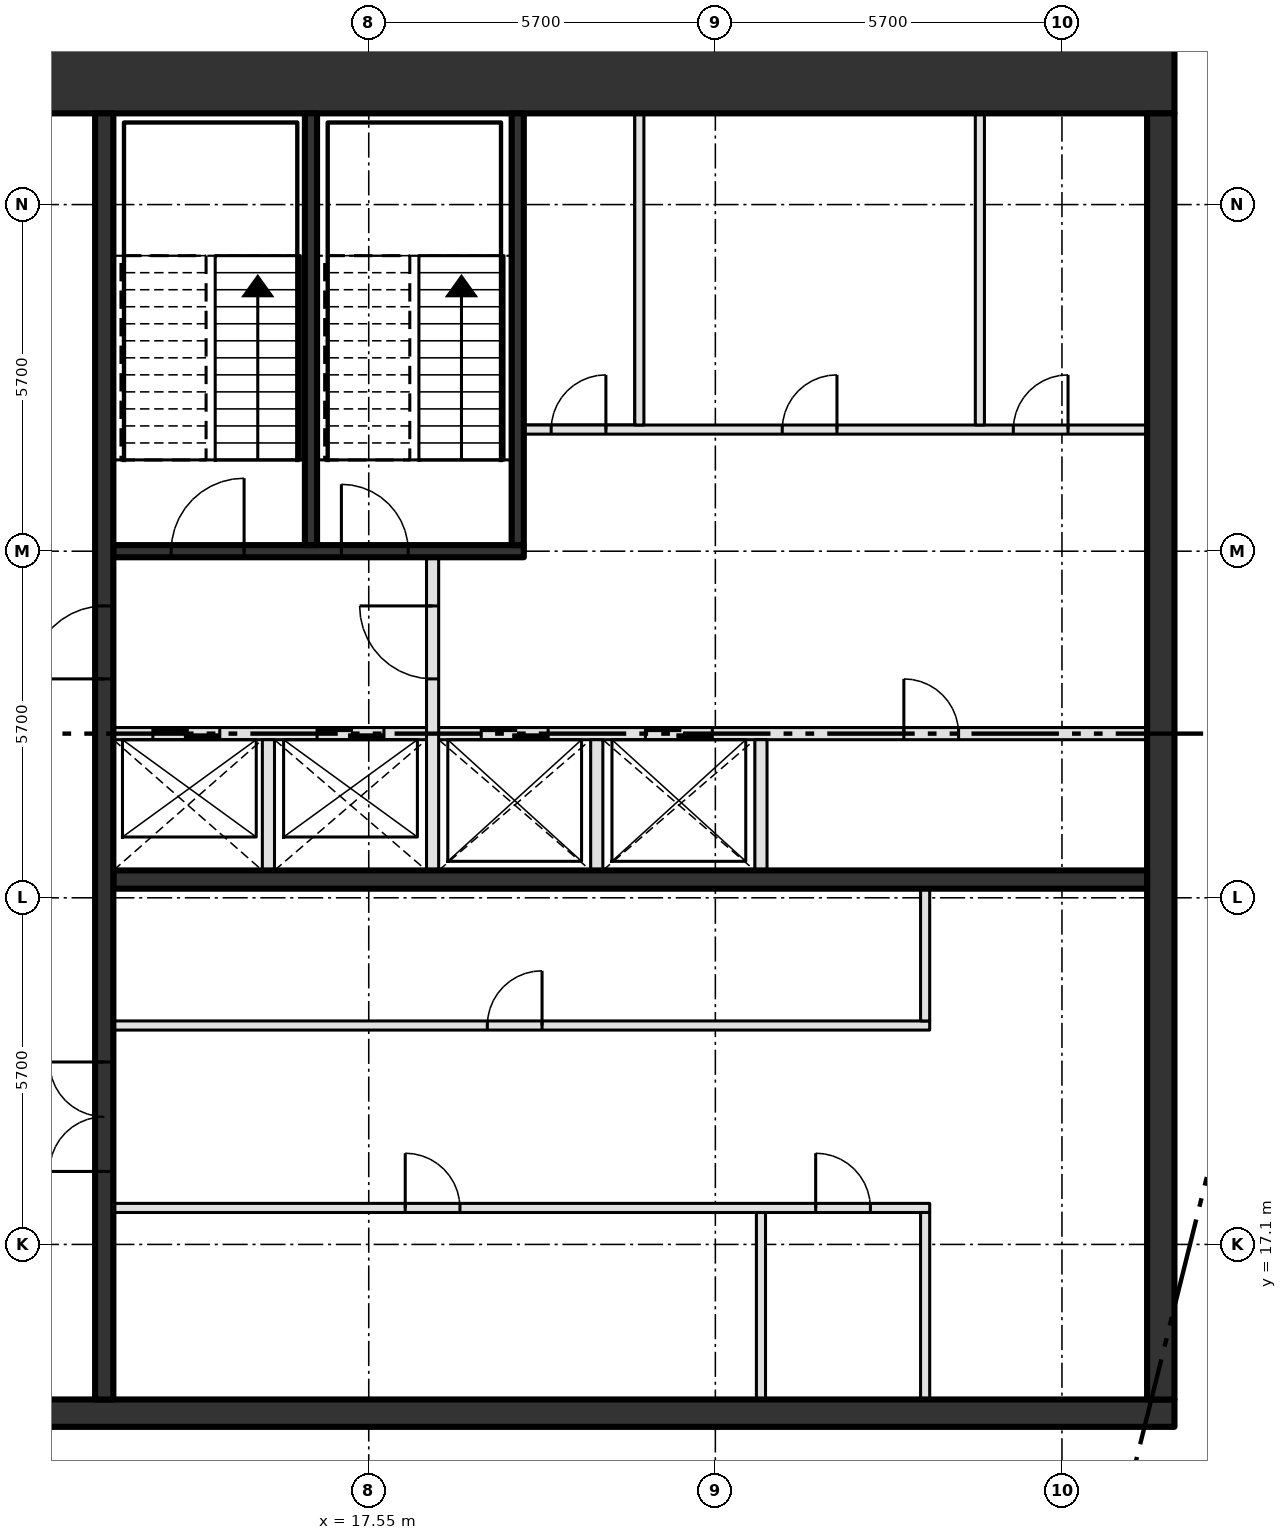
"""IFC4 building model, lengths in metres.
Left out: names, types, materials, properties, quantities, classifications, styles, units other than length and angle.
Written with IfcOpenShell. Run it as: python <this file> out.ifc"""

import sys

from ifc_helpers import new_model, si_unit, direction, frame, frame_2d, origin, place, context, subcontext, project, spatial, rectangle, extrude, element, fill, save


model = new_model("IFC4")
c1 = context("Model", 3, precision=1e-05, world=origin(), true_north=direction((0.0, 1.0)))
c2 = subcontext(c1, "Body", "Model", "MODEL_VIEW")
j1 = project(units=[si_unit("LENGTHUNIT", "METRE"), si_unit("PLANEANGLEUNIT", "RADIAN")], contexts=[c1])
p1 = place(None, origin())
s1 = spatial("IfcSite", under=j1, at=p1, CompositionType="ELEMENT")
p2 = place(p1, origin())
s2 = spatial("IfcBuilding", under=s1, at=p2, CompositionType="ELEMENT")
p3 = place(p2, frame((0.0, 0.0, 405.0)))
s3 = spatial("IfcBuildingStorey", under=s2, at=p3, CompositionType="ELEMENT", Elevation=405.0)
p4 = place(p3, frame((8.0, 14.325, -0.3), z_axis=(0.0, 0.0, 1.0), x_axis=(1.0, 0.0, 0.0)))
e1 = element("IfcWall", 1, at=p4, inside=s3, PredefinedType="SHEAR", context=c2, shape_type="SweptSolid", body=[
    extrude(rectangle(XDim=22.8, YDim=0.45, at=frame_2d((11.4, 0.0))), origin(), (0.0, 0.0, 1.0), 4.65),
])
p5 = place(p4, frame((2.3, 0.0, 0.3)))
e2 = element("IfcOpeningElement", 2, at=p5, cuts=e1, PredefinedType="OPENING", context=c2, shape_type="SweptSolid", body=[
    extrude(rectangle(XDim=1.8, YDim=2.1, at=frame_2d((0.9, 1.05))), frame((0.0, 0.235, 0.0), z_axis=(0.0, -1.0, 0.0), x_axis=(1.0, 0.0, 0.0)), (0.0, 0.0, 1.0), 0.47),
])
p6 = place(p3, frame((8.0, 36.3, -0.3), z_axis=(0.0, 0.0, 1.0), x_axis=(1.0, 0.0, 0.0)))
e3 = element("IfcWall", 3, at=p6, inside=s3, PredefinedType="SHEAR", context=c2, shape_type="SweptSolid", body=[
    extrude(rectangle(XDim=22.8, YDim=1.2, at=frame_2d((11.4, 0.0))), origin(), (0.0, 0.0, 1.0), 4.65),
])
p7 = place(p6, frame((2.3, 0.0, 0.3)))
e4 = element("IfcOpeningElement", 4, at=p7, cuts=e3, PredefinedType="OPENING", context=c2, shape_type="SweptSolid", body=[
    extrude(rectangle(XDim=1.8, YDim=2.1, at=frame_2d((0.9, 1.05))), frame((0.0, 0.61, 0.0), z_axis=(0.0, -1.0, 0.0), x_axis=(1.0, 0.0, 0.0)), (0.0, 0.0, 1.0), 1.22),
])
p8 = place(p3, frame((30.575, 14.55, -0.3), z_axis=(0.0, 0.0, 1.0), x_axis=(0.0, 1.0, 0.0)))
e5 = element("IfcWall", 5, at=p8, inside=s3, PredefinedType="SHEAR", context=c2, shape_type="SweptSolid", body=[
    extrude(rectangle(XDim=21.15, YDim=0.45, at=frame_2d((10.575, 0.0))), origin(), (0.0, 0.0, 1.0), 4.65),
])
p9 = place(p3, frame((13.35, 17.7, 0.0), z_axis=(0.0, 0.0, 1.0), x_axis=(1.0, 0.0, 0.0)))
e6 = element("IfcWall", 6, at=p9, inside=s3, PredefinedType="PARTITIONING", context=c2, shape_type="SweptSolid", body=[
    extrude(rectangle(XDim=13.425, YDim=0.15, at=frame_2d((6.712, 0.0))), origin(), (0.0, 0.0, 1.0), 4.35),
])
p10 = place(p9, frame((4.8, 0.0, 0.0)))
e7 = element("IfcOpeningElement", 7, at=p10, cuts=e6, PredefinedType="OPENING", context=c2, shape_type="SweptSolid", body=[
    extrude(rectangle(XDim=0.9, YDim=2.1, at=frame_2d((0.45, 1.05))), frame((0.0, 0.085, 0.0), z_axis=(0.0, -1.0, 0.0), x_axis=(1.0, 0.0, 0.0)), (0.0, 0.0, 1.0), 0.17),
])
p11 = place(p9, frame((11.55, 0.0, 0.0)))
e8 = element("IfcOpeningElement", 8, at=p11, cuts=e6, PredefinedType="OPENING", context=c2, shape_type="SweptSolid", body=[
    extrude(rectangle(XDim=0.9, YDim=2.1, at=frame_2d((0.45, 1.05))), frame((0.0, 0.085, 0.0), z_axis=(0.0, -1.0, 0.0), x_axis=(1.0, 0.0, 0.0)), (0.0, 0.0, 1.0), 0.17),
])
p12 = place(p3, frame((13.35, 20.7, 0.0), z_axis=(0.0, 0.0, 1.0), x_axis=(1.0, 0.0, 0.0)))
e9 = element("IfcWall", 9, at=p12, inside=s3, PredefinedType="PARTITIONING", context=c2, shape_type="SweptSolid", body=[
    extrude(rectangle(XDim=13.425, YDim=0.15, at=frame_2d((6.712, 0.0))), origin(), (0.0, 0.0, 1.0), 4.35),
])
p13 = place(p12, frame((6.15, 0.0, 0.0)))
e10 = element("IfcOpeningElement", 10, at=p13, cuts=e9, PredefinedType="OPENING", context=c2, shape_type="SweptSolid", body=[
    extrude(rectangle(XDim=0.9, YDim=2.1, at=frame_2d((0.45, 1.05))), frame((0.0, 0.085, 0.0), z_axis=(0.0, -1.0, 0.0), x_axis=(1.0, 0.0, 0.0)), (0.0, 0.0, 1.0), 0.17),
])
p14 = place(p3, frame((13.35, 23.1, 0.0), z_axis=(0.0, 0.0, 1.0), x_axis=(1.0, 0.0, 0.0)))
e11 = element("IfcWall", 11, at=p14, inside=s3, PredefinedType="SHEAR", context=c2, shape_type="SweptSolid", body=[
    extrude(rectangle(XDim=17.0, YDim=0.3, at=frame_2d((8.5, 0.0))), origin(), (0.0, 0.0, 1.0), 4.35),
])
p15 = place(p3, frame((13.35, 25.5, 0.0), z_axis=(0.0, 0.0, 1.0), x_axis=(1.0, 0.0, 0.0)))
e12 = element("IfcWall", 12, at=p15, inside=s3, PredefinedType="SOLIDWALL", context=c2, shape_type="SweptSolid", body=[
    extrude(rectangle(XDim=17.0, YDim=0.2, at=frame_2d((8.5, 0.0))), origin(), (0.0, 0.0, 1.0), 4.35),
])
p16 = place(p15, frame((0.65, 0.0, 0.0)))
e13 = element("IfcOpeningElement", 13, at=p16, cuts=e12, PredefinedType="OPENING", context=c2, shape_type="SweptSolid", body=[
    extrude(rectangle(XDim=1.1, YDim=2.1, at=frame_2d((0.55, 1.05))), frame((0.0, 0.11, 0.0), z_axis=(0.0, -1.0, 0.0), x_axis=(1.0, 0.0, 0.0)), (0.0, 0.0, 1.0), 0.22),
])
p17 = place(p15, frame((3.35, 0.0, 0.0)))
e14 = element("IfcOpeningElement", 14, at=p17, cuts=e12, PredefinedType="OPENING", context=c2, shape_type="SweptSolid", body=[
    extrude(rectangle(XDim=1.1, YDim=2.1, at=frame_2d((0.55, 1.05))), frame((0.0, 0.11, 0.0), z_axis=(0.0, -1.0, 0.0), x_axis=(1.0, 0.0, 0.0)), (0.0, 0.0, 1.0), 0.22),
])
p18 = place(p15, frame((6.05, 0.0, 0.0)))
e15 = element("IfcOpeningElement", 15, at=p18, cuts=e12, PredefinedType="OPENING", context=c2, shape_type="SweptSolid", body=[
    extrude(rectangle(XDim=1.1, YDim=2.1, at=frame_2d((0.55, 1.05))), frame((0.0, 0.11, 0.0), z_axis=(0.0, -1.0, 0.0), x_axis=(1.0, 0.0, 0.0)), (0.0, 0.0, 1.0), 0.22),
])
p19 = place(p15, frame((8.75, 0.0, 0.0)))
e16 = element("IfcOpeningElement", 16, at=p19, cuts=e12, PredefinedType="OPENING", context=c2, shape_type="SweptSolid", body=[
    extrude(rectangle(XDim=1.1, YDim=2.1, at=frame_2d((0.55, 1.05))), frame((0.0, 0.11, 0.0), z_axis=(0.0, -1.0, 0.0), x_axis=(1.0, 0.0, 0.0)), (0.0, 0.0, 1.0), 0.22),
])
p20 = place(p15, frame((13.0, 0.0, 0.0)))
e17 = element("IfcOpeningElement", 17, at=p20, cuts=e12, PredefinedType="OPENING", context=c2, shape_type="SweptSolid", body=[
    extrude(rectangle(XDim=0.9, YDim=2.1, at=frame_2d((0.45, 1.05))), frame((0.0, 0.11, 0.0), z_axis=(0.0, -1.0, 0.0), x_axis=(1.0, 0.0, 0.0)), (0.0, 0.0, 1.0), 0.22),
])
p21 = place(p3, frame((13.35, 28.5, 0.0), z_axis=(0.0, 0.0, 1.0), x_axis=(1.0, 0.0, 0.0)))
e18 = element("IfcWall", 18, at=p21, inside=s3, PredefinedType="SOLIDWALL", context=c2, shape_type="SweptSolid", body=[
    extrude(rectangle(XDim=6.75, YDim=0.2, at=frame_2d((3.375, 0.0))), origin(), (0.0, 0.0, 1.0), 4.35),
])
p22 = place(p21, frame((0.95, 0.0, 0.0)))
e19 = element("IfcOpeningElement", 19, at=p22, cuts=e18, PredefinedType="OPENING", context=c2, shape_type="SweptSolid", body=[
    extrude(rectangle(XDim=1.2, YDim=2.1, at=frame_2d((0.6, 1.05))), frame((0.0, 0.11, 0.0), z_axis=(0.0, -1.0, 0.0), x_axis=(1.0, 0.0, 0.0)), (0.0, 0.0, 1.0), 0.22),
])
p23 = place(p21, frame((3.75, 0.0, 0.0)))
e20 = element("IfcOpeningElement", 20, at=p23, cuts=e18, PredefinedType="OPENING", context=c2, shape_type="SweptSolid", body=[
    extrude(rectangle(XDim=1.1, YDim=2.1, at=frame_2d((0.55, 1.05))), frame((0.0, 0.11, 0.0), z_axis=(0.0, -1.0, 0.0), x_axis=(1.0, 0.0, 0.0)), (0.0, 0.0, 1.0), 0.22),
])
p24 = place(p3, frame((20.1, 30.5, 0.0), z_axis=(0.0, 0.0, 1.0), x_axis=(1.0, 0.0, 0.0)))
e21 = element("IfcWall", 21, at=p24, inside=s3, PredefinedType="PARTITIONING", context=c2, shape_type="SweptSolid", body=[
    extrude(rectangle(XDim=10.25, YDim=0.15, at=frame_2d((5.125, 0.0))), origin(), (0.0, 0.0, 1.0), 4.35),
])
p25 = place(p24, frame((0.45, 0.0, 0.0)))
e22 = element("IfcOpeningElement", 22, at=p25, cuts=e21, PredefinedType="OPENING", context=c2, shape_type="SweptSolid", body=[
    extrude(rectangle(XDim=0.9, YDim=2.1, at=frame_2d((0.45, 1.05))), frame((0.0, 0.085, 0.0), z_axis=(0.0, -1.0, 0.0), x_axis=(1.0, 0.0, 0.0)), (0.0, 0.0, 1.0), 0.17),
])
p26 = place(p24, frame((4.25, 0.0, 0.0)))
e23 = element("IfcOpeningElement", 23, at=p26, cuts=e21, PredefinedType="OPENING", context=c2, shape_type="SweptSolid", body=[
    extrude(rectangle(XDim=0.9, YDim=2.1, at=frame_2d((0.45, 1.05))), frame((0.0, 0.085, 0.0), z_axis=(0.0, -1.0, 0.0), x_axis=(1.0, 0.0, 0.0)), (0.0, 0.0, 1.0), 0.17),
])
p27 = place(p24, frame((8.05, 0.0, 0.0)))
e24 = element("IfcOpeningElement", 24, at=p27, cuts=e21, PredefinedType="OPENING", context=c2, shape_type="SweptSolid", body=[
    extrude(rectangle(XDim=0.9, YDim=2.1, at=frame_2d((0.45, 1.05))), frame((0.0, 0.085, 0.0), z_axis=(0.0, -1.0, 0.0), x_axis=(1.0, 0.0, 0.0)), (0.0, 0.0, 1.0), 0.17),
])
p28 = place(p3, frame((13.2, 14.55, 0.0), z_axis=(0.0, 0.0, 1.0), x_axis=(0.0, 1.0, 0.0)))
e25 = element("IfcWall", 25, at=p28, inside=s3, PredefinedType="SHEAR", context=c2, shape_type="SweptSolid", body=[
    extrude(rectangle(XDim=21.15, YDim=0.3, at=frame_2d((10.575, 0.0))), origin(), (0.0, 0.0, 1.0), 4.35),
])
p29 = place(p28, frame((3.75, 0.0, 0.0)))
e26 = element("IfcOpeningElement", 26, at=p29, cuts=e25, PredefinedType="OPENING", context=c2, shape_type="SweptSolid", body=[
    extrude(rectangle(XDim=1.8, YDim=2.1, at=frame_2d((0.9, 1.05))), frame((0.0, 0.16, 0.0), z_axis=(0.0, -1.0, 0.0), x_axis=(1.0, 0.0, 0.0)), (0.0, 0.0, 1.0), 0.32),
])
p30 = place(p28, frame((11.85, 0.0, 0.0)))
e27 = element("IfcOpeningElement", 27, at=p30, cuts=e25, PredefinedType="OPENING", context=c2, shape_type="SweptSolid", body=[
    extrude(rectangle(XDim=1.2, YDim=2.1, at=frame_2d((0.6, 1.05))), frame((0.0, 0.16, 0.0), z_axis=(0.0, -1.0, 0.0), x_axis=(1.0, 0.0, 0.0)), (0.0, 0.0, 1.0), 0.32),
])
p31 = place(p3, frame((15.9, 23.25, 0.0), z_axis=(0.0, 0.0, 1.0), x_axis=(0.0, 1.0, 0.0)))
e28 = element("IfcWall", 28, at=p31, inside=s3, PredefinedType="SOLIDWALL", context=c2, shape_type="SweptSolid", body=[
    extrude(rectangle(XDim=2.15, YDim=0.2, at=frame_2d((1.075, 0.0))), origin(), (0.0, 0.0, 1.0), 4.35),
])
p32 = place(p3, frame((16.6, 28.6, 0.0), z_axis=(0.0, 0.0, 1.0), x_axis=(0.0, 1.0, 0.0)))
e29 = element("IfcWall", 29, at=p32, inside=s3, PredefinedType="SOLIDWALL", context=c2, shape_type="SweptSolid", body=[
    extrude(rectangle(XDim=7.1, YDim=0.2, at=frame_2d((3.55, 0.0))), origin(), (0.0, 0.0, 1.0), 4.35),
])
p33 = place(p3, frame((18.6, 23.25, 0.0), z_axis=(0.0, 0.0, 1.0), x_axis=(0.0, 1.0, 0.0)))
e30 = element("IfcWall", 30, at=p33, inside=s3, PredefinedType="SOLIDWALL", context=c2, shape_type="SweptSolid", body=[
    extrude(rectangle(XDim=5.15, YDim=0.2, at=frame_2d((2.575, 0.0))), origin(), (0.0, 0.0, 1.0), 4.35),
])
p34 = place(p33, frame((3.15, 0.0, 0.0)))
e31 = element("IfcOpeningElement", 31, at=p34, cuts=e30, PredefinedType="OPENING", context=c2, shape_type="SweptSolid", body=[
    extrude(rectangle(XDim=1.2, YDim=2.1, at=frame_2d((0.6, 1.05))), frame((0.0, 0.11, 0.0), z_axis=(0.0, -1.0, 0.0), x_axis=(1.0, 0.0, 0.0)), (0.0, 0.0, 1.0), 0.22),
])
p35 = place(p3, frame((20.0, 28.6, 0.0), z_axis=(0.0, 0.0, 1.0), x_axis=(0.0, 1.0, 0.0)))
e32 = element("IfcWall", 32, at=p35, inside=s3, PredefinedType="SOLIDWALL", context=c2, shape_type="SweptSolid", body=[
    extrude(rectangle(XDim=7.1, YDim=0.2, at=frame_2d((3.55, 0.0))), origin(), (0.0, 0.0, 1.0), 4.35),
])
p36 = place(p3, frame((21.3, 23.25, 0.0), z_axis=(0.0, 0.0, 1.0), x_axis=(0.0, 1.0, 0.0)))
e33 = element("IfcWall", 33, at=p36, inside=s3, PredefinedType="SOLIDWALL", context=c2, shape_type="SweptSolid", body=[
    extrude(rectangle(XDim=2.15, YDim=0.2, at=frame_2d((1.075, 0.0))), origin(), (0.0, 0.0, 1.0), 4.35),
])
p37 = place(p3, frame((22.0, 30.575, 0.0), z_axis=(0.0, 0.0, 1.0), x_axis=(0.0, 1.0, 0.0)))
e34 = element("IfcWall", 34, at=p37, inside=s3, PredefinedType="PARTITIONING", context=c2, shape_type="SweptSolid", body=[
    extrude(rectangle(XDim=5.125, YDim=0.15, at=frame_2d((2.562, 0.0))), origin(), (0.0, 0.0, 1.0), 4.35),
])
p38 = place(p3, frame((24.0, 14.55, 0.0), z_axis=(0.0, 0.0, 1.0), x_axis=(0.0, 1.0, 0.0)))
e35 = element("IfcWall", 35, at=p38, inside=s3, PredefinedType="PARTITIONING", context=c2, shape_type="SweptSolid", body=[
    extrude(rectangle(XDim=3.075, YDim=0.15, at=frame_2d((1.538, 0.0))), origin(), (0.0, 0.0, 1.0), 4.35),
])
p39 = place(p3, frame((24.0, 23.25, 0.0), z_axis=(0.0, 0.0, 1.0), x_axis=(0.0, 1.0, 0.0)))
e36 = element("IfcWall", 36, at=p39, inside=s3, PredefinedType="SOLIDWALL", context=c2, shape_type="SweptSolid", body=[
    extrude(rectangle(XDim=2.15, YDim=0.2, at=frame_2d((1.075, 0.0))), origin(), (0.0, 0.0, 1.0), 4.35),
])
p40 = place(p3, frame((26.7, 14.55, 0.0), z_axis=(0.0, 0.0, 1.0), x_axis=(0.0, 1.0, 0.0)))
e37 = element("IfcWall", 37, at=p40, inside=s3, PredefinedType="PARTITIONING", context=c2, shape_type="SweptSolid", body=[
    extrude(rectangle(XDim=3.075, YDim=0.15, at=frame_2d((1.538, 0.0))), origin(), (0.0, 0.0, 1.0), 4.35),
])
p41 = place(p3, frame((26.7, 20.775, 0.0), z_axis=(0.0, 0.0, 1.0), x_axis=(0.0, 1.0, 0.0)))
e38 = element("IfcWall", 38, at=p41, inside=s3, PredefinedType="PARTITIONING", context=c2, shape_type="SweptSolid", body=[
    extrude(rectangle(XDim=2.175, YDim=0.15, at=frame_2d((1.087, 0.0))), origin(), (0.0, 0.0, 1.0), 4.35),
])
p42 = place(p3, frame((27.6, 30.575, 0.0), z_axis=(0.0, 0.0, 1.0), x_axis=(0.0, 1.0, 0.0)))
e39 = element("IfcWall", 39, at=p42, inside=s3, PredefinedType="PARTITIONING", context=c2, shape_type="SweptSolid", body=[
    extrude(rectangle(XDim=5.125, YDim=0.15, at=frame_2d((2.562, 0.0))), origin(), (0.0, 0.0, 1.0), 4.35),
])
p43 = place(p16, origin())
e40 = element("IfcDoor", 40, at=p43, inside=s3, OperationType="SLIDING_TO_LEFT", PredefinedType="DOOR", context=c2, shape_type="SweptSolid", body=[
    extrude(rectangle(XDim=1.1, YDim=2.1, at=frame_2d((0.55, 1.05))), frame((0.0, 0.025, 0.0), z_axis=(0.0, -1.0, 0.0), x_axis=(1.0, 0.0, 0.0)), (0.0, 0.0, 1.0), 0.05),
])
fill(e13, e40)
p44 = place(p17, origin())
e41 = element("IfcDoor", 41, at=p44, inside=s3, OperationType="SLIDING_TO_LEFT", PredefinedType="DOOR", context=c2, shape_type="SweptSolid", body=[
    extrude(rectangle(XDim=1.1, YDim=2.1, at=frame_2d((0.55, 1.05))), frame((0.0, 0.025, 0.0), z_axis=(0.0, -1.0, 0.0), x_axis=(1.0, 0.0, 0.0)), (0.0, 0.0, 1.0), 0.05),
])
fill(e14, e41)
p45 = place(p18, origin())
e42 = element("IfcDoor", 42, at=p45, inside=s3, OperationType="SLIDING_TO_LEFT", PredefinedType="DOOR", context=c2, shape_type="SweptSolid", body=[
    extrude(rectangle(XDim=1.1, YDim=2.1, at=frame_2d((0.55, 1.05))), frame((0.0, 0.025, 0.0), z_axis=(0.0, -1.0, 0.0), x_axis=(1.0, 0.0, 0.0)), (0.0, 0.0, 1.0), 0.05),
])
fill(e15, e42)
p46 = place(p19, origin())
e43 = element("IfcDoor", 43, at=p46, inside=s3, OperationType="SLIDING_TO_LEFT", PredefinedType="DOOR", context=c2, shape_type="SweptSolid", body=[
    extrude(rectangle(XDim=1.1, YDim=2.1, at=frame_2d((0.55, 1.05))), frame((0.0, 0.025, 0.0), z_axis=(0.0, -1.0, 0.0), x_axis=(1.0, 0.0, 0.0)), (0.0, 0.0, 1.0), 0.05),
])
fill(e16, e43)
p47 = place(p10, origin())
e44 = element("IfcDoor", 44, at=p47, inside=s3, OperationType="SINGLE_SWING_LEFT", PredefinedType="DOOR", context=c2, shape_type="SweptSolid", body=[
    extrude(rectangle(XDim=0.9, YDim=2.1, at=frame_2d((0.45, 1.05))), frame((0.0, 0.025, 0.0), z_axis=(0.0, -1.0, 0.0), x_axis=(1.0, 0.0, 0.0)), (0.0, 0.0, 1.0), 0.05),
])
fill(e7, e44)
p48 = place(p11, origin())
e45 = element("IfcDoor", 45, at=p48, inside=s3, OperationType="SINGLE_SWING_LEFT", PredefinedType="DOOR", context=c2, shape_type="SweptSolid", body=[
    extrude(rectangle(XDim=0.9, YDim=2.1, at=frame_2d((0.45, 1.05))), frame((0.0, 0.025, 0.0), z_axis=(0.0, -1.0, 0.0), x_axis=(1.0, 0.0, 0.0)), (0.0, 0.0, 1.0), 0.05),
])
fill(e8, e45)
p49 = place(p13, origin())
e46 = element("IfcDoor", 46, at=p49, inside=s3, OperationType="SINGLE_SWING_RIGHT", PredefinedType="DOOR", context=c2, shape_type="SweptSolid", body=[
    extrude(rectangle(XDim=0.9, YDim=2.1, at=frame_2d((0.45, 1.05))), frame((0.0, 0.025, 0.0), z_axis=(0.0, -1.0, 0.0), x_axis=(1.0, 0.0, 0.0)), (0.0, 0.0, 1.0), 0.05),
])
fill(e10, e46)
p50 = place(p20, origin())
e47 = element("IfcDoor", 47, at=p50, inside=s3, OperationType="SINGLE_SWING_LEFT", PredefinedType="DOOR", context=c2, shape_type="SweptSolid", body=[
    extrude(rectangle(XDim=0.9, YDim=2.1, at=frame_2d((0.45, 1.05))), frame((0.0, 0.025, 0.0), z_axis=(0.0, -1.0, 0.0), x_axis=(1.0, 0.0, 0.0)), (0.0, 0.0, 1.0), 0.05),
])
fill(e17, e47)
p51 = place(p25, origin())
e48 = element("IfcDoor", 48, at=p51, inside=s3, OperationType="SINGLE_SWING_RIGHT", PredefinedType="DOOR", context=c2, shape_type="SweptSolid", body=[
    extrude(rectangle(XDim=0.9, YDim=2.1, at=frame_2d((0.45, 1.05))), frame((0.0, 0.025, 0.0), z_axis=(0.0, -1.0, 0.0), x_axis=(1.0, 0.0, 0.0)), (0.0, 0.0, 1.0), 0.05),
])
fill(e22, e48)
p52 = place(p26, origin())
e49 = element("IfcDoor", 49, at=p52, inside=s3, OperationType="SINGLE_SWING_RIGHT", PredefinedType="DOOR", context=c2, shape_type="SweptSolid", body=[
    extrude(rectangle(XDim=0.9, YDim=2.1, at=frame_2d((0.45, 1.05))), frame((0.0, 0.025, 0.0), z_axis=(0.0, -1.0, 0.0), x_axis=(1.0, 0.0, 0.0)), (0.0, 0.0, 1.0), 0.05),
])
fill(e23, e49)
p53 = place(p27, origin())
e50 = element("IfcDoor", 50, at=p53, inside=s3, OperationType="SINGLE_SWING_RIGHT", PredefinedType="DOOR", context=c2, shape_type="SweptSolid", body=[
    extrude(rectangle(XDim=0.9, YDim=2.1, at=frame_2d((0.45, 1.05))), frame((0.0, 0.025, 0.0), z_axis=(0.0, -1.0, 0.0), x_axis=(1.0, 0.0, 0.0)), (0.0, 0.0, 1.0), 0.05),
])
fill(e24, e50)
p54 = place(p22, origin())
e51 = element("IfcDoor", 51, at=p54, inside=s3, OperationType="SINGLE_SWING_RIGHT", PredefinedType="DOOR", context=c2, shape_type="SweptSolid", body=[
    extrude(rectangle(XDim=1.2, YDim=2.1, at=frame_2d((0.6, 1.05))), frame((0.0, 0.025, 0.0), z_axis=(0.0, -1.0, 0.0), x_axis=(1.0, 0.0, 0.0)), (0.0, 0.0, 1.0), 0.05),
])
fill(e19, e51)
p55 = place(p23, origin())
e52 = element("IfcDoor", 52, at=p55, inside=s3, OperationType="SINGLE_SWING_LEFT", PredefinedType="DOOR", context=c2, shape_type="SweptSolid", body=[
    extrude(rectangle(XDim=1.1, YDim=2.1, at=frame_2d((0.55, 1.05))), frame((0.0, 0.025, 0.0), z_axis=(0.0, -1.0, 0.0), x_axis=(1.0, 0.0, 0.0)), (0.0, 0.0, 1.0), 0.05),
])
fill(e20, e52)
p56 = place(p29, origin())
e53 = element("IfcDoor", 53, at=p56, inside=s3, OperationType="DOUBLE_DOOR_SINGLE_SWING", PredefinedType="DOOR", context=c2, shape_type="SweptSolid", body=[
    extrude(rectangle(XDim=1.8, YDim=2.1, at=frame_2d((0.9, 1.05))), frame((0.0, 0.025, 0.0), z_axis=(0.0, -1.0, 0.0), x_axis=(1.0, 0.0, 0.0)), (0.0, 0.0, 1.0), 0.05),
])
fill(e26, e53)
p57 = place(p30, origin())
e54 = element("IfcDoor", 54, at=p57, inside=s3, OperationType="SINGLE_SWING_LEFT", PredefinedType="DOOR", context=c2, shape_type="SweptSolid", body=[
    extrude(rectangle(XDim=1.2, YDim=2.1, at=frame_2d((0.6, 1.05))), frame((0.0, 0.025, 0.0), z_axis=(0.0, -1.0, 0.0), x_axis=(1.0, 0.0, 0.0)), (0.0, 0.0, 1.0), 0.05),
])
fill(e27, e54)
p58 = place(p34, origin())
e55 = element("IfcDoor", 55, at=p58, inside=s3, OperationType="SINGLE_SWING_RIGHT", PredefinedType="DOOR", context=c2, shape_type="SweptSolid", body=[
    extrude(rectangle(XDim=1.2, YDim=2.1, at=frame_2d((0.6, 1.05))), frame((0.0, 0.025, 0.0), z_axis=(0.0, -1.0, 0.0), x_axis=(1.0, 0.0, 0.0)), (0.0, 0.0, 1.0), 0.05),
])
fill(e31, e55)
save(model, sys.argv[1])
